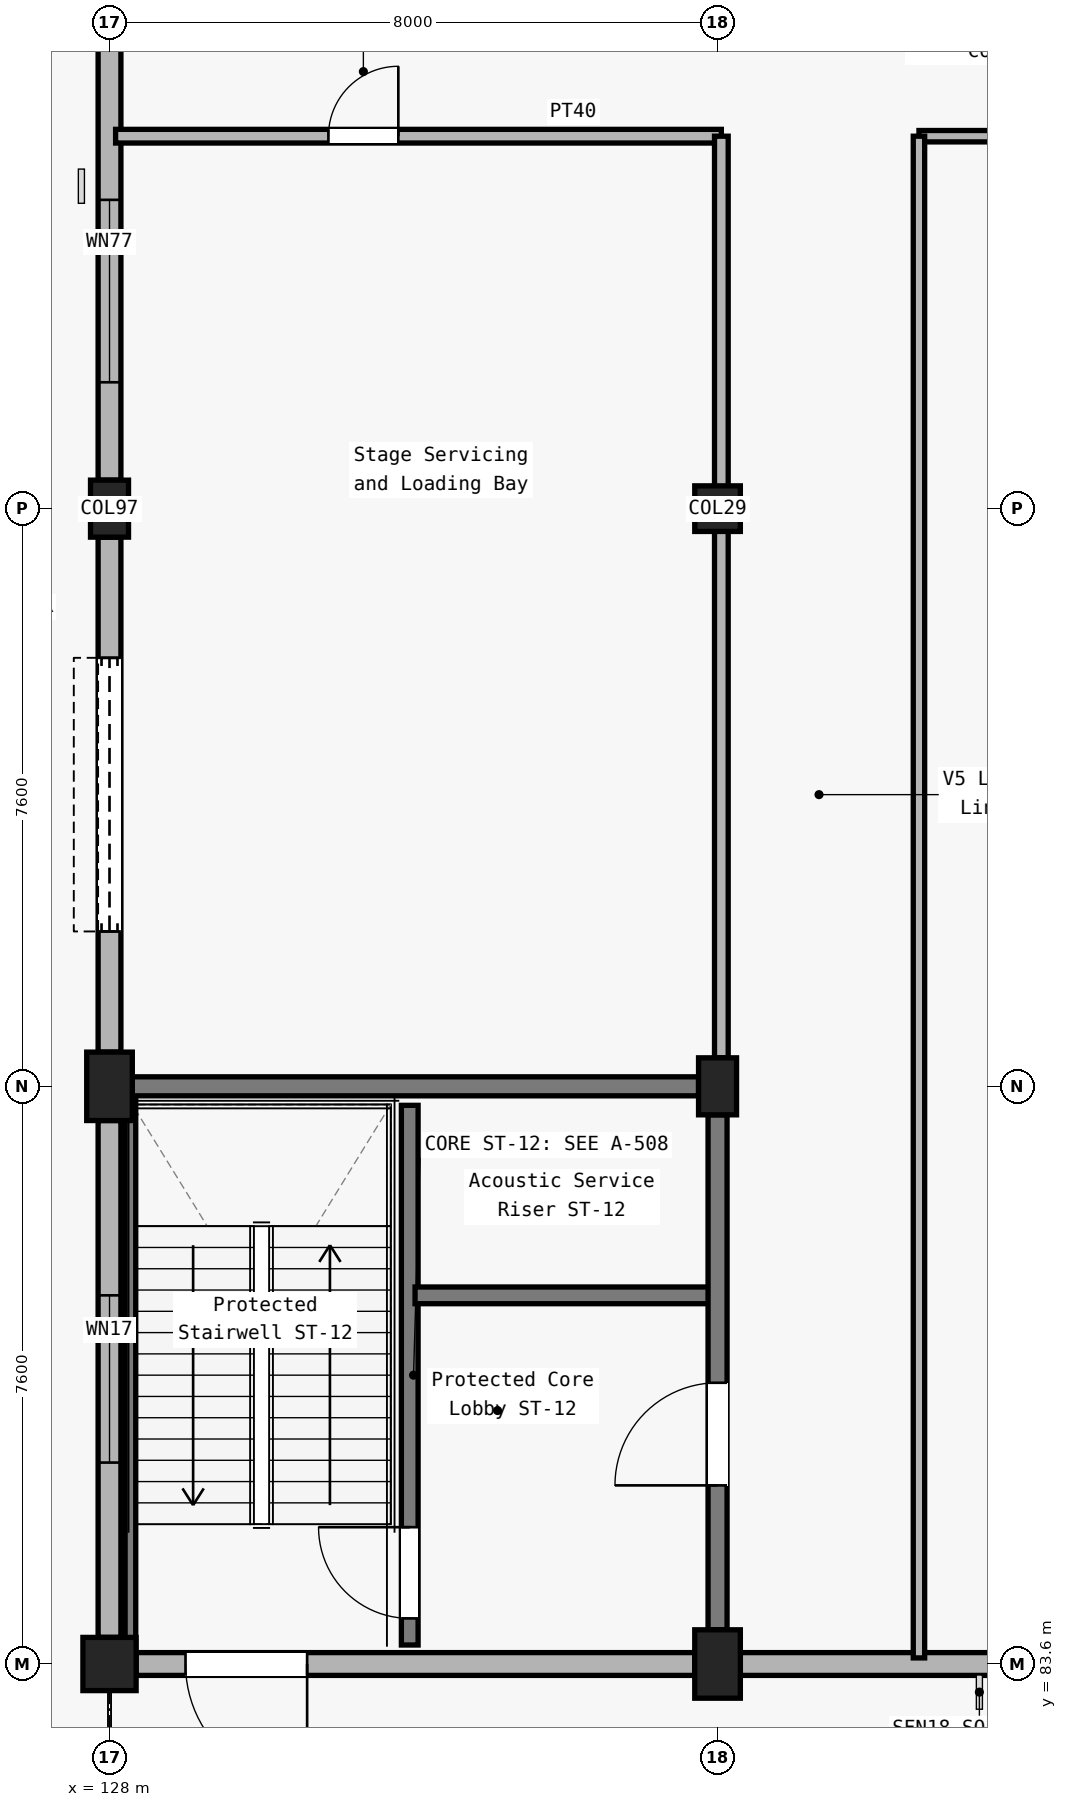
"""IFC4 building model, lengths in metres.
Left out: names, types, materials, properties, quantities, classifications, styles, units other than length and angle.
Written with IfcOpenShell. Run it as: python <this file> out.ifc"""

import sys

from ifc_helpers import new_model, si_unit, direction, frame, frame_2d, origin, origin_2d, place, context, subcontext, project, spatial, rectangle, extrude, element, fill, save


model = new_model("IFC4")
c1 = context("Model", 3, precision=1e-05, world=origin(), true_north=direction((0.0, 1.0)))
c2 = subcontext(c1, "Body", "Model", "MODEL_VIEW")
j1 = project(units=[si_unit("LENGTHUNIT", "METRE"), si_unit("PLANEANGLEUNIT", "RADIAN")], contexts=[c1])
p1 = place(None, origin())
s1 = spatial("IfcSite", under=j1, at=p1, CompositionType="ELEMENT")
p2 = place(p1, origin())
s2 = spatial("IfcBuilding", under=s1, at=p2, CompositionType="ELEMENT")
p3 = place(p2, origin())
s3 = spatial("IfcBuildingStorey", under=s2, at=p3, CompositionType="ELEMENT", Elevation=0.0)
p4 = place(p3, frame((128.0, 83.6, 0.0), z_axis=(0.0, 0.0, 1.0), x_axis=(1.0, 0.0, 0.0)))
e1 = element("IfcColumn", 1, at=p4, inside=s3, PredefinedType="COLUMN", context=c2, shape_type="SweptSolid", body=[
    extrude(rectangle(XDim=0.7, YDim=0.7, at=origin_2d()), origin(), (0.0, 0.0, 1.0), 5.4),
])
p5 = place(p3, frame((128.0, 91.2, 0.0), z_axis=(0.0, 0.0, 1.0), x_axis=(1.0, 0.0, 0.0)))
e2 = element("IfcColumn", 2, at=p5, inside=s3, PredefinedType="COLUMN", context=c2, shape_type="SweptSolid", body=[
    extrude(rectangle(XDim=0.6, YDim=0.9, at=origin_2d()), origin(), (0.0, 0.0, 1.0), 5.4),
])
p6 = place(p3, frame((128.0, 98.8, 0.0), z_axis=(0.0, 0.0, 1.0), x_axis=(1.0, 0.0, 0.0)))
e3 = element("IfcColumn", 3, at=p6, inside=s3, PredefinedType="COLUMN", context=c2, shape_type="SweptSolid", body=[
    extrude(rectangle(XDim=0.5, YDim=0.75, at=origin_2d()), origin(), (0.0, 0.0, 1.0), 5.4),
])
p7 = place(p3, frame((136.0, 83.6, 0.0), z_axis=(0.0, 0.0, 1.0), x_axis=(1.0, 0.0, 0.0)))
e4 = element("IfcColumn", 4, at=p7, inside=s3, PredefinedType="COLUMN", context=c2, shape_type="SweptSolid", body=[
    extrude(rectangle(XDim=0.6, YDim=0.9, at=origin_2d()), origin(), (0.0, 0.0, 1.0), 5.4),
])
p8 = place(p3, frame((136.0, 91.2, 0.0), z_axis=(0.0, 0.0, 1.0), x_axis=(1.0, 0.0, 0.0)))
e5 = element("IfcColumn", 5, at=p8, inside=s3, PredefinedType="COLUMN", context=c2, shape_type="SweptSolid", body=[
    extrude(rectangle(XDim=0.5, YDim=0.75, at=origin_2d()), origin(), (0.0, 0.0, 1.0), 5.4),
])
p9 = place(p3, frame((136.0, 98.8, 0.0), z_axis=(0.0, 0.0, 1.0), x_axis=(1.0, 0.0, 0.0)))
e6 = element("IfcColumn", 6, at=p9, inside=s3, PredefinedType="COLUMN", context=c2, shape_type="SweptSolid", body=[
    extrude(rectangle(XDim=0.6, YDim=0.6, at=origin_2d()), origin(), (0.0, 0.0, 1.0), 5.4),
])
p10 = place(p3, frame((135.7, 83.6, 0.0), z_axis=(0.0, 0.0, 1.0), x_axis=(-1.0, 0.0, 0.0)))
e7 = element("IfcWall", 7, at=p10, inside=s3, PredefinedType="SOLIDWALL", context=c2, shape_type="SweptSolid", body=[
    extrude(rectangle(XDim=7.35, YDim=0.3, at=frame_2d((3.675, 0.0))), origin(), (0.0, 0.0, 1.0), 4.74),
])
p11 = place(p10, frame((5.1, 0.0, 0.0)))
e8 = element("IfcOpeningElement", 8, at=p11, cuts=e7, PredefinedType="OPENING", context=c2, shape_type="SweptSolid", body=[
    extrude(rectangle(XDim=1.6, YDim=2.2, at=frame_2d((0.8, 1.1))), frame((0.0, 0.16, 0.0), z_axis=(0.0, -1.0, 0.0), x_axis=(1.0, 0.0, 0.0)), (0.0, 0.0, 1.0), 0.32),
])
p12 = place(p3, frame((143.75, 83.6, 0.0), z_axis=(0.0, 0.0, 1.0), x_axis=(-1.0, 0.0, 0.0)))
e9 = element("IfcWall", 9, at=p12, inside=s3, PredefinedType="SOLIDWALL", context=c2, shape_type="SweptSolid", body=[
    extrude(rectangle(XDim=7.45, YDim=0.3, at=frame_2d((3.725, 0.0))), origin(), (0.0, 0.0, 1.0), 4.49),
])
p13 = place(p12, frame((1.425, 0.0, 0.95)))
e10 = element("IfcOpeningElement", 10, at=p13, cuts=e9, PredefinedType="OPENING", context=c2, shape_type="SweptSolid", body=[
    extrude(rectangle(XDim=2.7, YDim=1.8, at=frame_2d((1.35, 0.9))), frame((0.0, 0.16, 0.0), z_axis=(0.0, -1.0, 0.0), x_axis=(1.0, 0.0, 0.0)), (0.0, 0.0, 1.0), 0.32),
])
p14 = place(p3, frame((128.0, 83.95, 0.0), z_axis=(0.0, 0.0, 1.0), x_axis=(0.0, 1.0, 0.0)))
e11 = element("IfcWall", 11, at=p14, inside=s3, PredefinedType="SOLIDWALL", context=c2, shape_type="SweptSolid", body=[
    extrude(rectangle(XDim=6.8, YDim=0.3, at=frame_2d((3.4, 0.0))), origin(), (0.0, 0.0, 1.0), 4.73),
])
p15 = place(p14, frame((2.3, 0.0, 0.95)))
e12 = element("IfcOpeningElement", 12, at=p15, cuts=e11, PredefinedType="OPENING", context=c2, shape_type="SweptSolid", body=[
    extrude(rectangle(XDim=2.2, YDim=1.95, at=frame_2d((1.1, 0.975))), frame((0.0, 0.16, 0.0), z_axis=(0.0, -1.0, 0.0), x_axis=(1.0, 0.0, 0.0)), (0.0, 0.0, 1.0), 0.32),
])
p16 = place(p3, frame((128.0, 91.65, 0.0), z_axis=(0.0, 0.0, 1.0), x_axis=(0.0, 1.0, 0.0)))
e13 = element("IfcWall", 13, at=p16, inside=s3, PredefinedType="SOLIDWALL", context=c2, shape_type="SweptSolid", body=[
    extrude(rectangle(XDim=6.775, YDim=0.3, at=frame_2d((3.388, 0.0))), origin(), (0.0, 0.0, 1.0), 4.44),
])
p17 = place(p16, frame((1.587, 0.0, 0.0)))
e14 = element("IfcOpeningElement", 14, at=p17, cuts=e13, PredefinedType="OPENING", context=c2, shape_type="SweptSolid", body=[
    extrude(rectangle(XDim=3.6, YDim=3.2, at=frame_2d((1.8, 1.6))), frame((0.0, 0.16, 0.0), z_axis=(0.0, -1.0, 0.0), x_axis=(1.0, 0.0, 0.0)), (0.0, 0.0, 1.0), 0.32),
])
p18 = place(p3, frame((128.0, 99.175, 0.0), z_axis=(0.0, 0.0, 1.0), x_axis=(0.0, 1.0, 0.0)))
e15 = element("IfcWall", 15, at=p18, inside=s3, PredefinedType="SOLIDWALL", context=c2, shape_type="SweptSolid", body=[
    extrude(rectangle(XDim=6.925, YDim=0.3, at=frame_2d((3.462, 0.0))), origin(), (0.0, 0.0, 1.0), 4.44),
])
p19 = place(p18, frame((1.288, 0.0, 0.95)))
e16 = element("IfcOpeningElement", 16, at=p19, cuts=e15, PredefinedType="OPENING", context=c2, shape_type="SweptSolid", body=[
    extrude(rectangle(XDim=2.4, YDim=1.95, at=frame_2d((1.2, 0.975))), frame((0.0, 0.16, 0.0), z_axis=(0.0, -1.0, 0.0), x_axis=(1.0, 0.0, 0.0)), (0.0, 0.0, 1.0), 0.32),
])
p20 = place(p3, frame((128.3, 91.2, 0.0), z_axis=(0.0, 0.0, 1.0), x_axis=(1.0, 0.0, 0.0)))
e17 = element("IfcWall", 17, at=p20, inside=s3, PredefinedType="SOLIDWALL", context=c2, shape_type="SweptSolid", body=[
    extrude(rectangle(XDim=7.45, YDim=0.25, at=frame_2d((3.725, 0.0))), origin(), (0.0, 0.0, 1.0), 4.455),
])
p21 = place(p3, frame((131.95, 83.85, 0.0), z_axis=(0.0, 0.0, 1.0), x_axis=(0.0, 1.0, 0.0)))
e18 = element("IfcWall", 18, at=p21, inside=s3, PredefinedType="SOLIDWALL", context=c2, shape_type="SweptSolid", body=[
    extrude(rectangle(XDim=7.1, YDim=0.22, at=frame_2d((3.55, 0.0))), origin(), (0.0, 0.0, 1.0), 5.1),
])
p22 = place(p21, frame((0.35, 0.0, 0.0)))
e19 = element("IfcOpeningElement", 19, at=p22, cuts=e18, PredefinedType="OPENING", context=c2, shape_type="SweptSolid", body=[
    extrude(rectangle(XDim=1.2, YDim=2.15, at=frame_2d((0.6, 1.075))), frame((0.0, 0.12, 0.0), z_axis=(0.0, -1.0, 0.0), x_axis=(1.0, 0.0, 0.0)), (0.0, 0.0, 1.0), 0.24),
])
p23 = place(p3, frame((132.02, 88.45, 0.0), z_axis=(0.0, 0.0, 1.0), x_axis=(1.0, 0.0, 0.0)))
e20 = element("IfcWall", 20, at=p23, inside=s3, PredefinedType="SOLIDWALL", context=c2, shape_type="SweptSolid", body=[
    extrude(rectangle(XDim=3.93, YDim=0.22, at=frame_2d((1.965, 0.0))), origin(), (0.0, 0.0, 1.0), 4.475),
])
p24 = place(p3, frame((136.0, 84.05, 0.0), z_axis=(0.0, 0.0, 1.0), x_axis=(0.0, 1.0, 0.0)))
e21 = element("IfcWall", 21, at=p24, inside=s3, PredefinedType="SOLIDWALL", context=c2, shape_type="SweptSolid", body=[
    extrude(rectangle(XDim=6.775, YDim=0.25, at=frame_2d((3.387, 0.0))), origin(), (0.0, 0.0, 1.0), 4.455),
])
p25 = place(p24, frame((1.9, 0.0, 0.0)))
e22 = element("IfcOpeningElement", 22, at=p25, cuts=e21, PredefinedType="OPENING", context=c2, shape_type="SweptSolid", body=[
    extrude(rectangle(XDim=1.35, YDim=2.2, at=frame_2d((0.675, 1.1))), frame((0.0, 0.135, 0.0), z_axis=(0.0, -1.0, 0.0), x_axis=(1.0, 0.0, 0.0)), (0.0, 0.0, 1.0), 0.27),
])
p26 = place(p3, frame((128.08, 103.7, 0.0), z_axis=(0.0, 0.0, 1.0), x_axis=(1.0, 0.0, 0.0)))
e23 = element("IfcWall", 23, at=p26, inside=s3, PredefinedType="PARTITIONING", context=c2, shape_type="SweptSolid", body=[
    extrude(rectangle(XDim=7.97, YDim=0.18, at=frame_2d((3.985, 0.0))), origin(), (0.0, 0.0, 1.0), 4.325),
])
p27 = place(p26, frame((2.8, 0.0, 0.0)))
e24 = element("IfcOpeningElement", 24, at=p27, cuts=e23, PredefinedType="OPENING", context=c2, shape_type="SweptSolid", body=[
    extrude(rectangle(XDim=0.92, YDim=2.05, at=frame_2d((0.46, 1.025))), frame((0.0, 0.1, 0.0), z_axis=(0.0, -1.0, 0.0), x_axis=(1.0, 0.0, 0.0)), (0.0, 0.0, 1.0), 0.2),
])
p28 = place(p3, frame((136.05, 91.575, 0.0), z_axis=(0.0, 0.0, 1.0), x_axis=(0.0, 1.0, 0.0)))
e25 = element("IfcWall", 25, at=p28, inside=s3, PredefinedType="PARTITIONING", context=c2, shape_type="SweptSolid", body=[
    extrude(rectangle(XDim=12.125, YDim=0.18, at=frame_2d((6.062, 0.0))), origin(), (0.0, 0.0, 1.0), 4.43),
])
p29 = place(p3, frame((138.65, 103.7, 0.0), z_axis=(0.0, 0.0, 1.0), x_axis=(1.0, 0.0, 0.0)))
e26 = element("IfcWall", 26, at=p29, inside=s3, PredefinedType="PARTITIONING", context=c2, shape_type="SweptSolid", body=[
    extrude(rectangle(XDim=13.35, YDim=0.15, at=frame_2d((6.675, 0.0))), origin(), (0.0, 0.0, 1.0), 4.275),
])
p30 = place(p29, frame((8.557, 0.0, 0.0)))
e27 = element("IfcOpeningElement", 27, at=p30, cuts=e26, PredefinedType="OPENING", context=c2, shape_type="SweptSolid", body=[
    extrude(rectangle(XDim=0.96, YDim=2.05, at=frame_2d((0.48, 1.025))), frame((0.0, 0.085, 0.0), z_axis=(0.0, -1.0, 0.0), x_axis=(1.0, 0.0, 0.0)), (0.0, 0.0, 1.0), 0.17),
])
p31 = place(p3, frame((138.65, 83.68, 0.0), z_axis=(0.0, 0.0, 1.0), x_axis=(0.0, 1.0, 0.0)))
e28 = element("IfcWall", 28, at=p31, inside=s3, PredefinedType="PARTITIONING", context=c2, shape_type="SweptSolid", body=[
    extrude(rectangle(XDim=20.02, YDim=0.15, at=frame_2d((10.01, 0.0))), origin(), (0.0, 0.0, 1.0), 4.43),
])
p32 = place(p3, frame((128.275, 83.75, 0.0), z_axis=(0.0, 0.0, 1.0), x_axis=(0.0, 1.0, 0.0)))
e29 = element("IfcWall", 29, at=p32, inside=s3, PredefinedType="SOLIDWALL", context=c2, shape_type="SweptSolid", body=[
    extrude(rectangle(XDim=7.3, YDim=0.14, at=frame_2d((3.65, 0.0))), origin(), (0.0, 0.0, 1.0), 5.1),
])
p33 = place(p11, origin())
e30 = element("IfcDoor", 30, at=p33, inside=s3, OperationType="SINGLE_SWING_LEFT", PredefinedType="DOOR", context=c2, shape_type="SweptSolid", body=[
    extrude(rectangle(XDim=1.6, YDim=2.2, at=frame_2d((0.8, 1.1))), frame((0.0, 0.025, 0.0), z_axis=(0.0, -1.0, 0.0), x_axis=(1.0, 0.0, 0.0)), (0.0, 0.0, 1.0), 0.05),
])
fill(e8, e30)
p34 = place(p15, origin())
e31 = element("IfcWindow", 31, at=p34, inside=s3, PartitioningType="DOUBLE_PANEL_VERTICAL", PredefinedType="WINDOW", context=c2, shape_type="SweptSolid", body=[
    extrude(rectangle(XDim=2.2, YDim=1.95, at=frame_2d((1.1, 0.975))), frame((0.0, 0.03, 0.0), z_axis=(0.0, -1.0, 0.0), x_axis=(1.0, 0.0, 0.0)), (0.0, 0.0, 1.0), 0.06),
])
fill(e12, e31)
p35 = place(p17, origin())
e32 = element("IfcDoor", 32, at=p35, inside=s3, OperationType="ROLLINGUP", PredefinedType="DOOR", context=c2, shape_type="SweptSolid", body=[
    extrude(rectangle(XDim=3.6, YDim=3.2, at=frame_2d((1.8, 1.6))), frame((0.0, 0.025, 0.0), z_axis=(0.0, -1.0, 0.0), x_axis=(1.0, 0.0, 0.0)), (0.0, 0.0, 1.0), 0.05),
])
fill(e14, e32)
p36 = place(p19, origin())
e33 = element("IfcWindow", 33, at=p36, inside=s3, PartitioningType="DOUBLE_PANEL_VERTICAL", PredefinedType="WINDOW", context=c2, shape_type="SweptSolid", body=[
    extrude(rectangle(XDim=2.4, YDim=1.95, at=frame_2d((1.2, 0.975))), frame((0.0, 0.03, 0.0), z_axis=(0.0, -1.0, 0.0), x_axis=(1.0, 0.0, 0.0)), (0.0, 0.0, 1.0), 0.06),
])
fill(e16, e33)
p37 = place(p22, origin())
e34 = element("IfcDoor", 34, at=p37, inside=s3, OperationType="SINGLE_SWING_RIGHT", PredefinedType="DOOR", context=c2, shape_type="SweptSolid", body=[
    extrude(rectangle(XDim=1.2, YDim=2.15, at=frame_2d((0.6, 1.075))), frame((0.0, 0.025, 0.0), z_axis=(0.0, -1.0, 0.0), x_axis=(1.0, 0.0, 0.0)), (0.0, 0.0, 1.0), 0.05),
])
fill(e19, e34)
p38 = place(p25, origin())
e35 = element("IfcDoor", 35, at=p38, inside=s3, OperationType="SINGLE_SWING_LEFT", PredefinedType="DOOR", context=c2, shape_type="SweptSolid", body=[
    extrude(rectangle(XDim=1.35, YDim=2.2, at=frame_2d((0.675, 1.1))), frame((0.0, 0.025, 0.0), z_axis=(0.0, -1.0, 0.0), x_axis=(1.0, 0.0, 0.0)), (0.0, 0.0, 1.0), 0.05),
])
fill(e22, e35)
p39 = place(p27, origin())
e36 = element("IfcDoor", 36, at=p39, inside=s3, OperationType="SINGLE_SWING_RIGHT", PredefinedType="DOOR", context=c2, shape_type="SweptSolid", body=[
    extrude(rectangle(XDim=0.92, YDim=2.05, at=frame_2d((0.46, 1.025))), frame((0.0, 0.025, 0.0), z_axis=(0.0, -1.0, 0.0), x_axis=(1.0, 0.0, 0.0)), (0.0, 0.0, 1.0), 0.05),
])
fill(e24, e36)
save(model, sys.argv[1])
